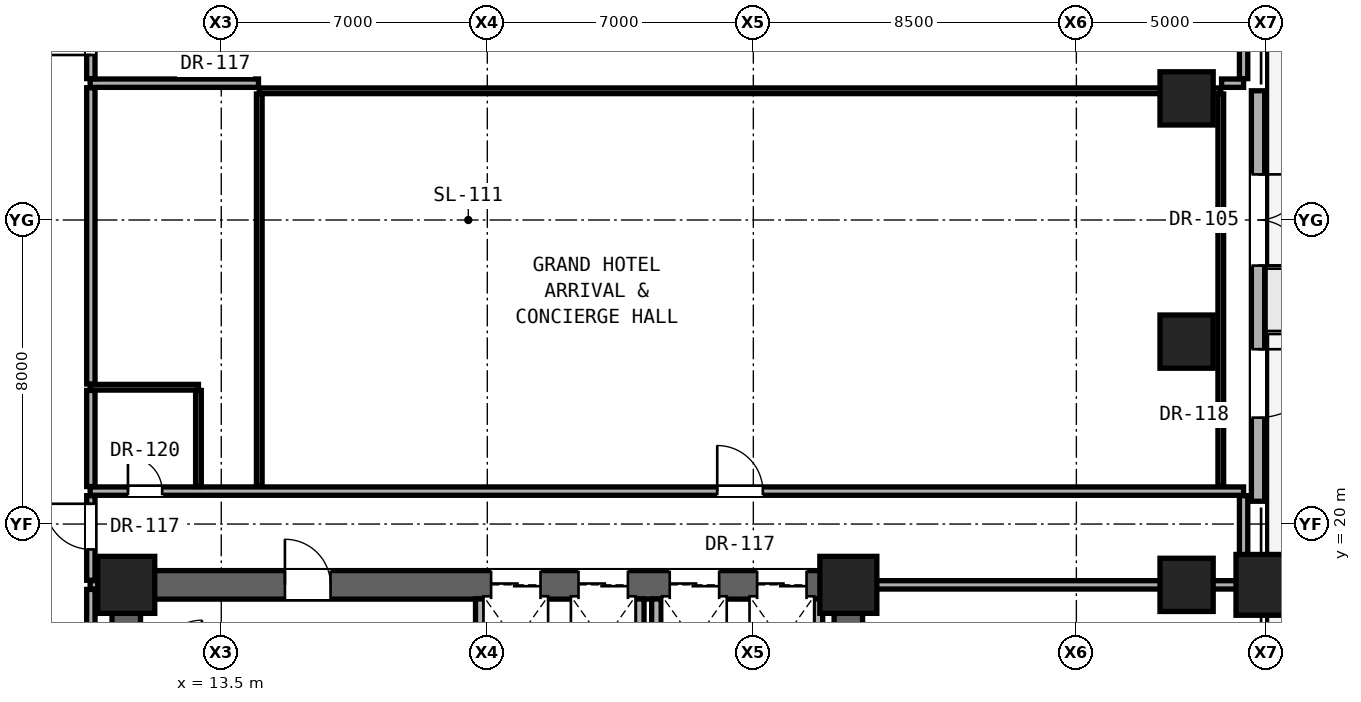
"""IFC4 building model, lengths in metres.
Left out: names, types, materials, properties, quantities, classifications, styles, units other than length and angle.
Written with IfcOpenShell. Run it as: python <this file> out.ifc"""

import sys

from ifc_helpers import new_model, si_unit, direction, frame, frame_2d, origin, origin_2d, place, context, subcontext, project, spatial, rectangle, hollow_rectangle, extrude, element, fill, save


model = new_model("IFC4")
c1 = context("Model", 3, precision=1e-05, world=origin(), true_north=direction((0.0, 1.0)))
c2 = subcontext(c1, "Body", "Model", "MODEL_VIEW")
j1 = project(units=[si_unit("LENGTHUNIT", "METRE"), si_unit("PLANEANGLEUNIT", "RADIAN")], contexts=[c1])
p1 = place(None, origin())
s1 = spatial("IfcSite", under=j1, at=p1, CompositionType="ELEMENT")
p2 = place(p1, origin())
s2 = spatial("IfcBuilding", under=s1, at=p2, CompositionType="ELEMENT")
p3 = place(p2, origin())
s3 = spatial("IfcBuildingStorey", under=s2, at=p3, CompositionType="ELEMENT", Elevation=0.0)
for number, where, z_axis, x_axis in (
    (1, (11.0, 18.4, 0.0), (0.0, 0.0, 1.0), (1.0, 0.0, 0.0)),
    (2, (30.0, 18.4, 0.0), (0.0, 0.0, 1.0), (1.0, 0.0, 0.0)),
):
    element("IfcColumn", number, at=place(p3, frame(where, z_axis=z_axis, x_axis=x_axis)), inside=s3, PredefinedType="COLUMN", context=c2, shape_type="SweptSolid", body=[
        extrude(rectangle(XDim=1.5, YDim=1.5, at=origin_2d()), origin(), (0.0, 0.0, 1.0), 5.2),
    ])
for number, where, z_axis, x_axis in (
    (3, (38.9, 18.4, 0.0), (0.0, 0.0, 1.0), (1.0, 0.0, 0.0)),
    (4, (38.9, 24.8, 0.0), (0.0, 0.0, 1.0), (1.0, 0.0, 0.0)),
    (5, (38.9, 31.2, 0.0), (0.0, 0.0, 1.0), (1.0, 0.0, 0.0)),
):
    element("IfcColumn", number, at=place(p3, frame(where, z_axis=z_axis, x_axis=x_axis)), inside=s3, PredefinedType="COLUMN", context=c2, shape_type="SweptSolid", body=[
        extrude(hollow_rectangle(XDim=1.4, YDim=1.4, WallThickness=0.08, at=origin_2d()), origin(), (0.0, 0.0, 1.0), 5.2),
    ])
for number, where, z_axis, x_axis in (
    (6, (11.0, 12.4, 0.0), (0.0, 0.0, 1.0), (0.0, 1.0, 0.0)),
    (7, (30.0, 12.4, 0.0), (0.0, 0.0, 1.0), (0.0, 1.0, 0.0)),
):
    element("IfcWall", number, at=place(p3, frame(where, z_axis=z_axis, x_axis=x_axis)), inside=s3, PredefinedType="SHEAR", context=c2, shape_type="SweptSolid", body=[
        extrude(rectangle(XDim=6.0, YDim=0.75, at=frame_2d((3.0, 0.0))), origin(), (0.0, 0.0, 1.0), 4.88),
    ])
p4 = place(p3, frame((11.0, 18.4, 0.0), z_axis=(0.0, 0.0, 1.0), x_axis=(1.0, 0.0, 0.0)))
e8 = element("IfcWall", 8, at=p4, inside=s3, PredefinedType="SHEAR", context=c2, shape_type="SweptSolid", body=[
    extrude(rectangle(XDim=19.0, YDim=0.75, at=frame_2d((9.5, 0.0))), origin(), (0.0, 0.0, 1.0), 4.88),
])
p5 = place(p4, frame((4.175, 0.0, 0.0)))
e9 = element("IfcOpeningElement", 9, at=p5, cuts=e8, PredefinedType="OPENING", context=c2, shape_type="SweptSolid", body=[
    extrude(rectangle(XDim=1.2, YDim=2.25, at=frame_2d((0.6, 1.125))), frame((0.0, 0.385, 0.0), z_axis=(0.0, -1.0, 0.0), x_axis=(1.0, 0.0, 0.0)), (0.0, 0.0, 1.0), 0.77),
])
p6 = place(p4, frame((9.6, 0.0, 0.0)))
e10 = element("IfcOpeningElement", 10, at=p6, cuts=e8, PredefinedType="OPENING", context=c2, shape_type="SweptSolid", body=[
    extrude(rectangle(XDim=1.3, YDim=2.3, at=frame_2d((0.65, 1.15))), frame((0.0, 0.385, 0.0), z_axis=(0.0, -1.0, 0.0), x_axis=(1.0, 0.0, 0.0)), (0.0, 0.0, 1.0), 0.77),
])
p7 = place(p4, frame((11.9, 0.0, 0.0)))
e11 = element("IfcOpeningElement", 11, at=p7, cuts=e8, PredefinedType="OPENING", context=c2, shape_type="SweptSolid", body=[
    extrude(rectangle(XDim=1.3, YDim=2.3, at=frame_2d((0.65, 1.15))), frame((0.0, 0.385, 0.0), z_axis=(0.0, -1.0, 0.0), x_axis=(1.0, 0.0, 0.0)), (0.0, 0.0, 1.0), 0.77),
])
p8 = place(p4, frame((14.3, 0.0, 0.0)))
e12 = element("IfcOpeningElement", 12, at=p8, cuts=e8, PredefinedType="OPENING", context=c2, shape_type="SweptSolid", body=[
    extrude(rectangle(XDim=1.3, YDim=2.3, at=frame_2d((0.65, 1.15))), frame((0.0, 0.385, 0.0), z_axis=(0.0, -1.0, 0.0), x_axis=(1.0, 0.0, 0.0)), (0.0, 0.0, 1.0), 0.77),
])
p9 = place(p4, frame((16.6, 0.0, 0.0)))
e13 = element("IfcOpeningElement", 13, at=p9, cuts=e8, PredefinedType="OPENING", context=c2, shape_type="SweptSolid", body=[
    extrude(rectangle(XDim=1.3, YDim=2.3, at=frame_2d((0.65, 1.15))), frame((0.0, 0.385, 0.0), z_axis=(0.0, -1.0, 0.0), x_axis=(1.0, 0.0, 0.0)), (0.0, 0.0, 1.0), 0.77),
])
p10 = place(p3, frame((41.0, 18.4, 0.0), z_axis=(0.0, 0.0, 1.0), x_axis=(1.0, 0.0, 0.0)))
e14 = element("IfcColumn", 14, at=p10, inside=s3, PredefinedType="COLUMN", context=c2, shape_type="SweptSolid", body=[
    extrude(rectangle(XDim=1.6, YDim=1.6, at=origin_2d()), origin(), (0.0, 0.0, 1.0), 5.2),
])
p11 = place(p3, frame((40.78, 31.4, 0.0), z_axis=(0.0, 0.0, 1.0), x_axis=(0.0, -1.0, 0.0)))
e15 = element("IfcWall", 15, at=p11, inside=s3, PredefinedType="SOLIDWALL", context=c2, shape_type="SweptSolid", body=[
    extrude(rectangle(XDim=10.8, YDim=0.35, at=frame_2d((5.4, 0.0))), origin(), (0.0, 0.0, 1.0), 3.832),
])
p12 = place(p11, frame((2.2, 0.0, 0.0)))
e16 = element("IfcOpeningElement", 16, at=p12, cuts=e15, PredefinedType="OPENING", context=c2, shape_type="SweptSolid", body=[
    extrude(rectangle(XDim=2.4, YDim=2.7, at=frame_2d((1.2, 1.35))), frame((0.0, 0.185, 0.0), z_axis=(0.0, -1.0, 0.0), x_axis=(1.0, 0.0, 0.0)), (0.0, 0.0, 1.0), 0.37),
])
p13 = place(p11, frame((6.8, 0.0, 0.0)))
e17 = element("IfcOpeningElement", 17, at=p13, cuts=e15, PredefinedType="OPENING", context=c2, shape_type="SweptSolid", body=[
    extrude(rectangle(XDim=1.8, YDim=2.5, at=frame_2d((0.9, 1.25))), frame((0.0, 0.185, 0.0), z_axis=(0.0, -1.0, 0.0), x_axis=(1.0, 0.0, 0.0)), (0.0, 0.0, 1.0), 0.37),
])
p14 = place(p3, frame((10.05, 18.4, 0.0), z_axis=(0.0, 0.0, 1.0), x_axis=(1.0, 0.0, 0.0)))
e18 = element("IfcWall", 18, at=p14, inside=s3, PredefinedType="SOLIDWALL", context=c2, shape_type="SweptSolid", body=[
    extrude(rectangle(XDim=0.58, YDim=0.22, at=frame_2d((0.29, 0.0))), origin(), (0.0, 0.0, 1.0), 3.772),
])
p15 = place(p3, frame((30.37, 18.4, 0.0), z_axis=(0.0, 0.0, 1.0), x_axis=(1.0, 0.0, 0.0)))
e19 = element("IfcWall", 19, at=p15, inside=s3, PredefinedType="SOLIDWALL", context=c2, shape_type="SweptSolid", body=[
    extrude(rectangle(XDim=10.03, YDim=0.22, at=frame_2d((5.015, 0.0))), origin(), (0.0, 0.0, 1.0), 3.772),
])
p16 = place(p3, frame((10.05, 20.867, 0.0), z_axis=(0.0, 0.0, 1.0), x_axis=(1.0, 0.0, 0.0)))
e20 = element("IfcWall", 20, at=p16, inside=s3, PredefinedType="SOLIDWALL", context=c2, shape_type="SweptSolid", body=[
    extrude(rectangle(XDim=30.35, YDim=0.22, at=frame_2d((15.175, 0.0))), origin(), (0.0, 0.0, 1.0), 3.832),
])
p17 = place(p16, frame((0.995, 0.0, 0.0)))
e21 = element("IfcOpeningElement", 21, at=p17, cuts=e20, PredefinedType="OPENING", context=c2, shape_type="SweptSolid", body=[
    extrude(rectangle(XDim=0.9, YDim=2.1, at=frame_2d((0.45, 1.05))), frame((0.0, 0.12, 0.0), z_axis=(0.0, -1.0, 0.0), x_axis=(1.0, 0.0, 0.0)), (0.0, 0.0, 1.0), 0.24),
])
p18 = place(p16, frame((16.5, 0.0, 0.0)))
e22 = element("IfcOpeningElement", 22, at=p18, cuts=e20, PredefinedType="OPENING", context=c2, shape_type="SweptSolid", body=[
    extrude(rectangle(XDim=1.2, YDim=2.25, at=frame_2d((0.6, 1.125))), frame((0.0, 0.12, 0.0), z_axis=(0.0, -1.0, 0.0), x_axis=(1.0, 0.0, 0.0)), (0.0, 0.0, 1.0), 0.24),
])
p19 = place(p3, frame((10.05, 23.6, 0.0), z_axis=(0.0, 0.0, 1.0), x_axis=(1.0, 0.0, 0.0)))
e23 = element("IfcWall", 23, at=p19, inside=s3, PredefinedType="PARTITIONING", context=c2, shape_type="SweptSolid", body=[
    extrude(rectangle(XDim=2.85, YDim=0.15, at=frame_2d((1.425, 0.0))), origin(), (0.0, 0.0, 1.0), 3.832),
])
p20 = place(p3, frame((14.5, 31.4, 0.0), z_axis=(0.0, 0.0, 1.0), x_axis=(1.0, 0.0, 0.0)))
e24 = element("IfcWall", 24, at=p20, inside=s3, PredefinedType="PARTITIONING", context=c2, shape_type="SweptSolid", body=[
    extrude(rectangle(XDim=25.3, YDim=0.15, at=frame_2d((12.65, 0.0))), origin(), (0.0, 0.0, 1.0), 3.832),
])
p21 = place(p3, frame((10.05, 31.6, 0.0), z_axis=(0.0, 0.0, 1.0), x_axis=(1.0, 0.0, 0.0)))
e25 = element("IfcWall", 25, at=p21, inside=s3, PredefinedType="SOLIDWALL", context=c2, shape_type="SweptSolid", body=[
    extrude(rectangle(XDim=4.43, YDim=0.22, at=frame_2d((2.215, 0.0))), origin(), (0.0, 0.0, 1.0), 3.832),
])
p22 = place(p3, frame((39.82, 31.6, 0.0), z_axis=(0.0, 0.0, 1.0), x_axis=(1.0, 0.0, 0.0)))
e26 = element("IfcWall", 26, at=p22, inside=s3, PredefinedType="SOLIDWALL", context=c2, shape_type="SweptSolid", body=[
    extrude(rectangle(XDim=0.58, YDim=0.22, at=frame_2d((0.29, 0.0))), origin(), (0.0, 0.0, 1.0), 4.88),
])
p23 = place(p3, frame((10.069, 12.77, 0.0), z_axis=(0.0, 0.0, 1.0), x_axis=(0.0, 1.0, 0.0)))
e27 = element("IfcWall", 27, at=p23, inside=s3, PredefinedType="SOLIDWALL", context=c2, shape_type="SweptSolid", body=[
    extrude(rectangle(XDim=5.51, YDim=0.22, at=frame_2d((2.755, 0.0))), origin(), (0.0, 0.0, 1.0), 3.772),
])
p24 = place(p3, frame((10.069, 18.52, 0.0), z_axis=(0.0, 0.0, 1.0), x_axis=(0.0, 1.0, 0.0)))
e28 = element("IfcWall", 28, at=p24, inside=s3, PredefinedType="SOLIDWALL", context=c2, shape_type="SweptSolid", body=[
    extrude(rectangle(XDim=2.227, YDim=0.22, at=frame_2d((1.113, 0.0))), origin(), (0.0, 0.0, 1.0), 3.772),
])
p25 = place(p24, frame((0.813, 0.0, 0.0)))
e29 = element("IfcOpeningElement", 29, at=p25, cuts=e28, PredefinedType="OPENING", context=c2, shape_type="SweptSolid", body=[
    extrude(rectangle(XDim=1.2, YDim=2.25, at=frame_2d((0.6, 1.125))), frame((0.0, 0.12, 0.0), z_axis=(0.0, -1.0, 0.0), x_axis=(1.0, 0.0, 0.0)), (0.0, 0.0, 1.0), 0.24),
])
p26 = place(p3, frame((10.069, 20.987, 0.0), z_axis=(0.0, 0.0, 1.0), x_axis=(0.0, 1.0, 0.0)))
e30 = element("IfcWall", 30, at=p26, inside=s3, PredefinedType="SOLIDWALL", context=c2, shape_type="SweptSolid", body=[
    extrude(rectangle(XDim=2.528, YDim=0.22, at=frame_2d((1.264, 0.0))), origin(), (0.0, 0.0, 1.0), 4.88),
])
p27 = place(p3, frame((10.069, 23.685, 0.0), z_axis=(0.0, 0.0, 1.0), x_axis=(0.0, 1.0, 0.0)))
e31 = element("IfcWall", 31, at=p27, inside=s3, PredefinedType="SOLIDWALL", context=c2, shape_type="SweptSolid", body=[
    extrude(rectangle(XDim=7.795, YDim=0.22, at=frame_2d((3.897, 0.0))), origin(), (0.0, 0.0, 1.0), 4.099),
])
p28 = place(p3, frame((10.069, 31.72, 0.0), z_axis=(0.0, 0.0, 1.0), x_axis=(0.0, 1.0, 0.0)))
e32 = element("IfcWall", 32, at=p28, inside=s3, PredefinedType="SOLIDWALL", context=c2, shape_type="SweptSolid", body=[
    extrude(rectangle(XDim=2.443, YDim=0.22, at=frame_2d((1.222, 0.0))), origin(), (0.0, 0.0, 1.0), 4.88),
])
p29 = place(p28, frame((0.622, 0.0, 0.0)))
e33 = element("IfcOpeningElement", 33, at=p29, cuts=e32, PredefinedType="OPENING", context=c2, shape_type="SweptSolid", body=[
    extrude(rectangle(XDim=1.2, YDim=2.25, at=frame_2d((0.6, 1.125))), frame((0.0, 0.12, 0.0), z_axis=(0.0, -1.0, 0.0), x_axis=(1.0, 0.0, 0.0)), (0.0, 0.0, 1.0), 0.24),
])
p30 = place(p3, frame((12.9, 20.987, 0.0), z_axis=(0.0, 0.0, 1.0), x_axis=(0.0, 1.0, 0.0)))
e34 = element("IfcWall", 34, at=p30, inside=s3, PredefinedType="PARTITIONING", context=c2, shape_type="SweptSolid", body=[
    extrude(rectangle(XDim=2.528, YDim=0.15, at=frame_2d((1.264, 0.0))), origin(), (0.0, 0.0, 1.0), 4.88),
])
p31 = place(p3, frame((14.5, 21.0, 0.0), z_axis=(0.0, 0.0, 1.0), x_axis=(0.0, 1.0, 0.0)))
e35 = element("IfcWall", 35, at=p31, inside=s3, PredefinedType="PARTITIONING", context=c2, shape_type="SweptSolid", body=[
    extrude(rectangle(XDim=10.315, YDim=0.15, at=frame_2d((5.157, 0.0))), origin(), (0.0, 0.0, 1.0), 3.832),
])
p32 = place(p3, frame((20.315, 16.555, 0.0), z_axis=(0.0, 0.0, 1.0), x_axis=(0.0, 1.0, 0.0)))
e36 = element("IfcWall", 36, at=p32, inside=s3, PredefinedType="SOLIDWALL", context=c2, shape_type="SweptSolid", body=[
    extrude(rectangle(XDim=1.475, YDim=0.25, at=frame_2d((0.738, 0.0))), origin(), (0.0, 0.0, 1.0), 4.88),
])
for number, where, z_axis, x_axis in (
    (37, (24.5, 15.785, 0.0), (0.0, 0.0, 1.0), (0.0, 1.0, 0.0)),
    (38, (24.95, 15.785, 0.0), (0.0, 0.0, 1.0), (0.0, 1.0, 0.0)),
    (39, (29.2, 15.785, 0.0), (0.0, 0.0, 1.0), (0.0, 1.0, 0.0)),
):
    element("IfcWall", number, at=place(p3, frame(where, z_axis=z_axis, x_axis=x_axis)), inside=s3, PredefinedType="SOLIDWALL", context=c2, shape_type="SweptSolid", body=[
        extrude(rectangle(XDim=2.245, YDim=0.25, at=frame_2d((1.123, 0.0))), origin(), (0.0, 0.0, 1.0), 4.88),
    ])
p33 = place(p3, frame((39.8, 21.0, 0.0), z_axis=(0.0, 0.0, 1.0), x_axis=(0.0, 1.0, 0.0)))
e40 = element("IfcWall", 40, at=p33, inside=s3, PredefinedType="PARTITIONING", context=c2, shape_type="SweptSolid", body=[
    extrude(rectangle(XDim=10.315, YDim=0.15, at=frame_2d((5.157, 0.0))), origin(), (0.0, 0.0, 1.0), 4.88),
])
p34 = place(p3, frame((40.4, 18.52, 0.0), z_axis=(0.0, 0.0, 1.0), x_axis=(0.0, 1.0, 0.0)))
e41 = element("IfcWall", 41, at=p34, inside=s3, PredefinedType="SOLIDWALL", context=c2, shape_type="SweptSolid", body=[
    extrude(rectangle(XDim=2.227, YDim=0.22, at=frame_2d((1.113, 0.0))), origin(), (0.0, 0.0, 1.0), 3.924),
])
p35 = place(p3, frame((40.4, 31.72, 0.0), z_axis=(0.0, 0.0, 1.0), x_axis=(0.0, 1.0, 0.0)))
e42 = element("IfcWall", 42, at=p35, inside=s3, PredefinedType="SOLIDWALL", context=c2, shape_type="SweptSolid", body=[
    extrude(rectangle(XDim=2.443, YDim=0.22, at=frame_2d((1.222, 0.0))), origin(), (0.0, 0.0, 1.0), 4.88),
])
p36 = place(p12, origin())
e43 = element("IfcDoor", 43, at=p36, inside=s3, OperationType="DOUBLE_DOOR_SINGLE_SWING", PredefinedType="DOOR", context=c2, shape_type="SweptSolid", body=[
    extrude(rectangle(XDim=2.4, YDim=2.7, at=frame_2d((1.2, 1.35))), frame((0.0, 0.025, 0.0), z_axis=(0.0, -1.0, 0.0), x_axis=(1.0, 0.0, 0.0)), (0.0, 0.0, 1.0), 0.05),
])
fill(e16, e43)
p37 = place(p13, origin())
e44 = element("IfcDoor", 44, at=p37, inside=s3, OperationType="SINGLE_SWING_LEFT", PredefinedType="DOOR", context=c2, shape_type="SweptSolid", body=[
    extrude(rectangle(XDim=1.8, YDim=2.5, at=frame_2d((0.9, 1.25))), frame((0.0, 0.025, 0.0), z_axis=(0.0, -1.0, 0.0), x_axis=(1.0, 0.0, 0.0)), (0.0, 0.0, 1.0), 0.05),
])
fill(e17, e44)
p38 = place(p25, origin())
e45 = element("IfcDoor", 45, at=p38, inside=s3, OperationType="SINGLE_SWING_RIGHT", PredefinedType="DOOR", context=c2, shape_type="SweptSolid", body=[
    extrude(rectangle(XDim=1.2, YDim=2.25, at=frame_2d((0.6, 1.125))), frame((0.0, 0.025, 0.0), z_axis=(0.0, -1.0, 0.0), x_axis=(1.0, 0.0, 0.0)), (0.0, 0.0, 1.0), 0.05),
])
fill(e29, e45)
p39 = place(p29, origin())
e46 = element("IfcDoor", 46, at=p39, inside=s3, OperationType="SINGLE_SWING_LEFT", PredefinedType="DOOR", context=c2, shape_type="SweptSolid", body=[
    extrude(rectangle(XDim=1.2, YDim=2.25, at=frame_2d((0.6, 1.125))), frame((0.0, 0.025, 0.0), z_axis=(0.0, -1.0, 0.0), x_axis=(1.0, 0.0, 0.0)), (0.0, 0.0, 1.0), 0.05),
])
fill(e33, e46)
p40 = place(p5, origin())
e47 = element("IfcDoor", 47, at=p40, inside=s3, OperationType="SINGLE_SWING_LEFT", PredefinedType="DOOR", context=c2, shape_type="SweptSolid", body=[
    extrude(rectangle(XDim=1.2, YDim=2.25, at=frame_2d((0.6, 1.125))), frame((0.0, 0.025, 0.0), z_axis=(0.0, -1.0, 0.0), x_axis=(1.0, 0.0, 0.0)), (0.0, 0.0, 1.0), 0.05),
])
fill(e9, e47)
p41 = place(p17, origin())
e48 = element("IfcDoor", 48, at=p41, inside=s3, OperationType="SINGLE_SWING_LEFT", PredefinedType="DOOR", context=c2, shape_type="SweptSolid", body=[
    extrude(rectangle(XDim=0.9, YDim=2.1, at=frame_2d((0.45, 1.05))), frame((0.0, 0.025, 0.0), z_axis=(0.0, -1.0, 0.0), x_axis=(1.0, 0.0, 0.0)), (0.0, 0.0, 1.0), 0.05),
])
fill(e21, e48)
p42 = place(p18, origin())
e49 = element("IfcDoor", 49, at=p42, inside=s3, OperationType="SINGLE_SWING_LEFT", PredefinedType="DOOR", context=c2, shape_type="SweptSolid", body=[
    extrude(rectangle(XDim=1.2, YDim=2.25, at=frame_2d((0.6, 1.125))), frame((0.0, 0.025, 0.0), z_axis=(0.0, -1.0, 0.0), x_axis=(1.0, 0.0, 0.0)), (0.0, 0.0, 1.0), 0.05),
])
fill(e22, e49)
p43 = place(p6, origin())
e50 = element("IfcDoor", 50, at=p43, inside=s3, OperationType="DOUBLE_DOOR_SLIDING", PredefinedType="DOOR", context=c2, shape_type="SweptSolid", body=[
    extrude(rectangle(XDim=1.3, YDim=2.3, at=frame_2d((0.65, 1.15))), frame((0.0, 0.025, 0.0), z_axis=(0.0, -1.0, 0.0), x_axis=(1.0, 0.0, 0.0)), (0.0, 0.0, 1.0), 0.05),
])
fill(e10, e50)
p44 = place(p7, origin())
e51 = element("IfcDoor", 51, at=p44, inside=s3, OperationType="DOUBLE_DOOR_SLIDING", PredefinedType="DOOR", context=c2, shape_type="SweptSolid", body=[
    extrude(rectangle(XDim=1.3, YDim=2.3, at=frame_2d((0.65, 1.15))), frame((0.0, 0.025, 0.0), z_axis=(0.0, -1.0, 0.0), x_axis=(1.0, 0.0, 0.0)), (0.0, 0.0, 1.0), 0.05),
])
fill(e11, e51)
p45 = place(p8, origin())
e52 = element("IfcDoor", 52, at=p45, inside=s3, OperationType="DOUBLE_DOOR_SLIDING", PredefinedType="DOOR", context=c2, shape_type="SweptSolid", body=[
    extrude(rectangle(XDim=1.3, YDim=2.3, at=frame_2d((0.65, 1.15))), frame((0.0, 0.025, 0.0), z_axis=(0.0, -1.0, 0.0), x_axis=(1.0, 0.0, 0.0)), (0.0, 0.0, 1.0), 0.05),
])
fill(e12, e52)
p46 = place(p9, origin())
e53 = element("IfcDoor", 53, at=p46, inside=s3, OperationType="DOUBLE_DOOR_SLIDING", PredefinedType="DOOR", context=c2, shape_type="SweptSolid", body=[
    extrude(rectangle(XDim=1.3, YDim=2.3, at=frame_2d((0.65, 1.15))), frame((0.0, 0.025, 0.0), z_axis=(0.0, -1.0, 0.0), x_axis=(1.0, 0.0, 0.0)), (0.0, 0.0, 1.0), 0.05),
])
fill(e13, e53)
save(model, sys.argv[1])
